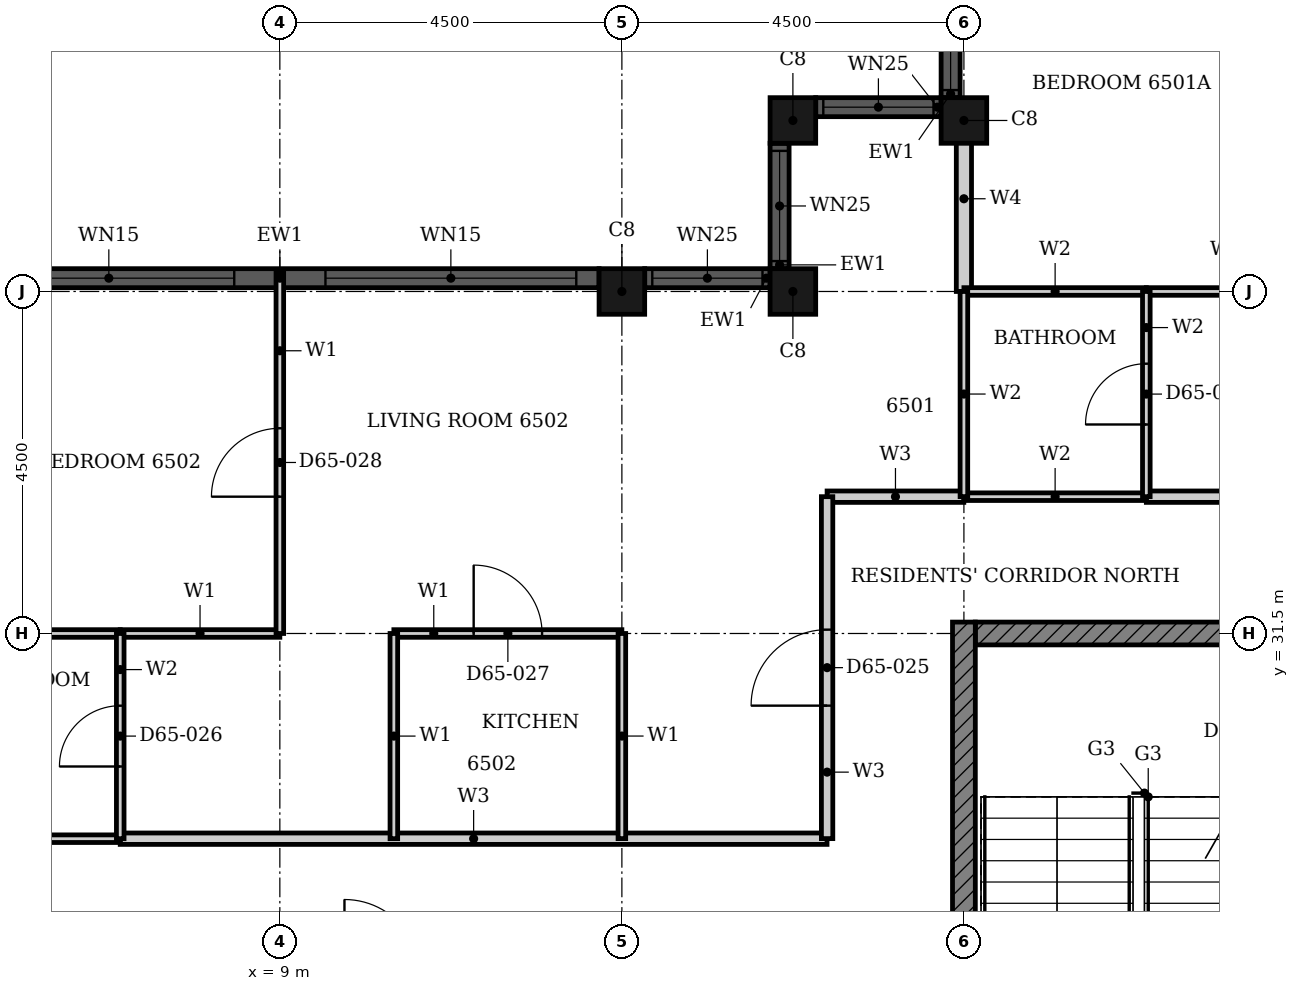
"""IFC4 building model, lengths in metres.
Left out: names, types, materials, properties, quantities, classifications, styles, units other than length and angle.
Written with IfcOpenShell. Run it as: python <this file> out.ifc"""

import sys

from ifc_helpers import new_model, si_unit, direction, frame, frame_2d, origin, origin_2d, place, context, subcontext, project, spatial, rectangle, hollow_rectangle, extrude, element, fill, save


model = new_model("IFC4")
c1 = context("Model", 3, precision=1e-05, world=origin(), true_north=direction((0.0, 1.0)))
c2 = subcontext(c1, "Body", "Model", "MODEL_VIEW")
j1 = project(units=[si_unit("LENGTHUNIT", "METRE"), si_unit("PLANEANGLEUNIT", "RADIAN")], contexts=[c1])
p1 = place(None, origin())
s1 = spatial("IfcSite", under=j1, at=p1, CompositionType="ELEMENT")
p2 = place(p1, origin())
s2 = spatial("IfcBuilding", under=s1, at=p2, CompositionType="ELEMENT")
p3 = place(p2, frame((0.0, 0.0, 256.4)))
s3 = spatial("IfcBuildingStorey", under=s2, at=p3, CompositionType="ELEMENT", Elevation=256.4)
for number, where, z_axis, x_axis in (
    (1, (18.0, 38.25, 0.0), (0.0, 0.0, 1.0), (1.0, 0.0, 0.0)),
    (2, (15.75, 38.25, 0.0), (0.0, 0.0, 1.0), (1.0, 0.0, 0.0)),
    (3, (15.75, 36.0, 0.0), (0.0, 0.0, 1.0), (1.0, 0.0, 0.0)),
    (4, (13.5, 36.0, 0.0), (0.0, 0.0, 1.0), (1.0, 0.0, 0.0)),
):
    element("IfcColumn", number, at=place(p3, frame(where, z_axis=z_axis, x_axis=x_axis)), inside=s3, PredefinedType="COLUMN", context=c2, shape_type="SweptSolid", body=[
        extrude(hollow_rectangle(XDim=0.6, YDim=0.6, WallThickness=0.02, at=origin_2d()), origin(), (0.0, 0.0, 1.0), 3.7),
    ])
p4 = place(p3, frame((17.825, 40.2, 0.0), z_axis=(0.0, 0.0, 1.0), x_axis=(0.0, -1.0, 0.0)))
e5 = element("IfcWall", 5, at=p4, inside=s3, PredefinedType="SOLIDWALL", context=c2, shape_type="SweptSolid", body=[
    extrude(rectangle(XDim=1.65, YDim=0.25, at=frame_2d((0.825, 0.0))), origin(), (0.0, 0.0, 1.0), 3.7),
])
p5 = place(p4, frame((0.1, 0.0, 0.9)))
e6 = element("IfcOpeningElement", 6, at=p5, cuts=e5, PredefinedType="OPENING", context=c2, shape_type="SweptSolid", body=[
    extrude(rectangle(XDim=1.45, YDim=1.85, at=frame_2d((0.725, 0.925))), frame((0.0, 0.135, 0.0), z_axis=(0.0, -1.0, 0.0), x_axis=(1.0, 0.0, 0.0)), (0.0, 0.0, 1.0), 0.27),
])
p6 = place(p3, frame((17.7, 38.425, 0.0), z_axis=(0.0, 0.0, 1.0), x_axis=(-1.0, 0.0, 0.0)))
e7 = element("IfcWall", 7, at=p6, inside=s3, PredefinedType="SOLIDWALL", context=c2, shape_type="SweptSolid", body=[
    extrude(rectangle(XDim=1.65, YDim=0.25, at=frame_2d((0.825, 0.0))), origin(), (0.0, 0.0, 1.0), 3.7),
])
p7 = place(p6, frame((0.1, 0.0, 0.9)))
e8 = element("IfcOpeningElement", 8, at=p7, cuts=e7, PredefinedType="OPENING", context=c2, shape_type="SweptSolid", body=[
    extrude(rectangle(XDim=1.45, YDim=1.85, at=frame_2d((0.725, 0.925))), frame((0.0, 0.135, 0.0), z_axis=(0.0, -1.0, 0.0), x_axis=(1.0, 0.0, 0.0)), (0.0, 0.0, 1.0), 0.27),
])
p8 = place(p3, frame((15.575, 37.95, 0.0), z_axis=(0.0, 0.0, 1.0), x_axis=(0.0, -1.0, 0.0)))
e9 = element("IfcWall", 9, at=p8, inside=s3, PredefinedType="SOLIDWALL", context=c2, shape_type="SweptSolid", body=[
    extrude(rectangle(XDim=1.65, YDim=0.25, at=frame_2d((0.825, 0.0))), origin(), (0.0, 0.0, 1.0), 3.7),
])
p9 = place(p8, frame((0.1, 0.0, 0.9)))
e10 = element("IfcOpeningElement", 10, at=p9, cuts=e9, PredefinedType="OPENING", context=c2, shape_type="SweptSolid", body=[
    extrude(rectangle(XDim=1.45, YDim=1.85, at=frame_2d((0.725, 0.925))), frame((0.0, 0.135, 0.0), z_axis=(0.0, -1.0, 0.0), x_axis=(1.0, 0.0, 0.0)), (0.0, 0.0, 1.0), 0.27),
])
p10 = place(p3, frame((15.45, 36.175, 0.0), z_axis=(0.0, 0.0, 1.0), x_axis=(-1.0, 0.0, 0.0)))
e11 = element("IfcWall", 11, at=p10, inside=s3, PredefinedType="SOLIDWALL", context=c2, shape_type="SweptSolid", body=[
    extrude(rectangle(XDim=1.65, YDim=0.25, at=frame_2d((0.825, 0.0))), origin(), (0.0, 0.0, 1.0), 3.7),
])
p11 = place(p10, frame((0.1, 0.0, 0.9)))
e12 = element("IfcOpeningElement", 12, at=p11, cuts=e11, PredefinedType="OPENING", context=c2, shape_type="SweptSolid", body=[
    extrude(rectangle(XDim=1.45, YDim=1.85, at=frame_2d((0.725, 0.925))), frame((0.0, 0.135, 0.0), z_axis=(0.0, -1.0, 0.0), x_axis=(1.0, 0.0, 0.0)), (0.0, 0.0, 1.0), 0.27),
])
p12 = place(p3, frame((13.2, 36.175, 0.0), z_axis=(0.0, 0.0, 1.0), x_axis=(-1.0, 0.0, 0.0)))
e13 = element("IfcWall", 13, at=p12, inside=s3, PredefinedType="SOLIDWALL", context=c2, shape_type="SweptSolid", body=[
    extrude(rectangle(XDim=8.4, YDim=0.25, at=frame_2d((4.2, 0.0))), origin(), (0.0, 0.0, 1.0), 3.7),
])
p13 = place(p12, frame((0.3, 0.0, 0.45)))
e14 = element("IfcOpeningElement", 14, at=p13, cuts=e13, PredefinedType="OPENING", context=c2, shape_type="SweptSolid", body=[
    extrude(rectangle(XDim=3.3, YDim=2.3, at=frame_2d((1.65, 1.15))), frame((0.0, 0.135, 0.0), z_axis=(0.0, -1.0, 0.0), x_axis=(1.0, 0.0, 0.0)), (0.0, 0.0, 1.0), 0.27),
])
p14 = place(p12, frame((4.8, 0.0, 0.45)))
e15 = element("IfcOpeningElement", 15, at=p14, cuts=e13, PredefinedType="OPENING", context=c2, shape_type="SweptSolid", body=[
    extrude(rectangle(XDim=3.3, YDim=2.3, at=frame_2d((1.65, 1.15))), frame((0.0, 0.135, 0.0), z_axis=(0.0, -1.0, 0.0), x_axis=(1.0, 0.0, 0.0)), (0.0, 0.0, 1.0), 0.27),
])
p15 = place(p3, frame((18.15, 31.5, 0.0), z_axis=(0.0, 0.0, 1.0), x_axis=(1.0, 0.0, 0.0)))
e16 = element("IfcWall", 16, at=p15, inside=s3, PredefinedType="SHEAR", context=c2, shape_type="SweptSolid", body=[
    extrude(rectangle(XDim=9.368, YDim=0.3, at=frame_2d((4.684, 0.0))), origin(), (0.0, 0.0, 1.0), 3.4),
])
p16 = place(p15, frame((4.736, 0.0, 0.0)))
e17 = element("IfcOpeningElement", 17, at=p16, cuts=e16, PredefinedType="OPENING", context=c2, shape_type="SweptSolid", body=[
    extrude(rectangle(XDim=1.8, YDim=2.1, at=frame_2d((0.9, 1.05))), frame((0.0, 0.16, 0.0), z_axis=(0.0, -1.0, 0.0), x_axis=(1.0, 0.0, 0.0)), (0.0, 0.0, 1.0), 0.32),
])
p17 = place(p3, frame((18.0, 22.35, 0.0), z_axis=(0.0, 0.0, 1.0), x_axis=(0.0, 1.0, 0.0)))
e18 = element("IfcWall", 18, at=p17, inside=s3, PredefinedType="SHEAR", context=c2, shape_type="SweptSolid", body=[
    extrude(rectangle(XDim=9.3, YDim=0.3, at=frame_2d((4.65, 0.0))), origin(), (0.0, 0.0, 1.0), 3.4),
])
p18 = place(p3, frame((6.9, 28.8, 0.0), z_axis=(0.0, 0.0, 1.0), x_axis=(1.0, 0.0, 0.0)))
e19 = element("IfcWall", 19, at=p18, inside=s3, PredefinedType="PARTITIONING", context=c2, shape_type="SweptSolid", body=[
    extrude(rectangle(XDim=9.299, YDim=0.15, at=frame_2d((4.649, 0.0))), origin(), (0.0, 0.0, 1.0), 3.4),
])
p19 = place(p3, frame((20.4, 33.3, 0.0), z_axis=(0.0, 0.0, 1.0), x_axis=(1.0, 0.0, 0.0)))
e20 = element("IfcWall", 20, at=p19, inside=s3, PredefinedType="PARTITIONING", context=c2, shape_type="SweptSolid", body=[
    extrude(rectangle(XDim=24.6, YDim=0.15, at=frame_2d((12.3, 0.0))), origin(), (0.0, 0.0, 1.0), 3.4),
])
p20 = place(p19, frame((1.6, 0.0, 0.0)))
e21 = element("IfcOpeningElement", 21, at=p20, cuts=e20, PredefinedType="OPENING", context=c2, shape_type="SweptSolid", body=[
    extrude(rectangle(XDim=1.0, YDim=2.2, at=frame_2d((0.5, 1.1))), frame((0.0, 0.085, 0.0), z_axis=(0.0, -1.0, 0.0), x_axis=(1.0, 0.0, 0.0)), (0.0, 0.0, 1.0), 0.17),
])
p21 = place(p19, frame((17.35, 0.0, 0.0)))
e22 = element("IfcOpeningElement", 22, at=p21, cuts=e20, PredefinedType="OPENING", context=c2, shape_type="SweptSolid", body=[
    extrude(rectangle(XDim=1.0, YDim=2.1, at=frame_2d((0.5, 1.05))), frame((0.0, 0.085, 0.0), z_axis=(0.0, -1.0, 0.0), x_axis=(1.0, 0.0, 0.0)), (0.0, 0.0, 1.0), 0.17),
])
p22 = place(p3, frame((16.2, 33.3, 0.0), z_axis=(0.0, 0.0, 1.0), x_axis=(1.0, 0.0, 0.0)))
e23 = element("IfcWall", 23, at=p22, inside=s3, PredefinedType="PARTITIONING", context=c2, shape_type="SweptSolid", body=[
    extrude(rectangle(XDim=1.799, YDim=0.15, at=frame_2d((0.899, 0.0))), origin(), (0.0, 0.0, 1.0), 3.4),
])
p23 = place(p3, frame((16.2, 28.801, 0.0), z_axis=(0.0, 0.0, 1.0), x_axis=(0.0, 1.0, 0.0)))
e24 = element("IfcWall", 24, at=p23, inside=s3, PredefinedType="PARTITIONING", context=c2, shape_type="SweptSolid", body=[
    extrude(rectangle(XDim=4.499, YDim=0.15, at=frame_2d((2.25, 0.0))), origin(), (0.0, 0.0, 1.0), 3.4),
])
p24 = place(p23, frame((1.75, 0.0, 0.0)))
e25 = element("IfcOpeningElement", 25, at=p24, cuts=e24, PredefinedType="OPENING", context=c2, shape_type="SweptSolid", body=[
    extrude(rectangle(XDim=1.0, YDim=2.2, at=frame_2d((0.5, 1.1))), frame((0.0, 0.085, 0.0), z_axis=(0.0, -1.0, 0.0), x_axis=(1.0, 0.0, 0.0)), (0.0, 0.0, 1.0), 0.17),
])
p25 = place(p3, frame((6.9, 31.5, 0.0), z_axis=(0.0, 0.0, 1.0), x_axis=(1.0, 0.0, 0.0)))
e26 = element("IfcWall", 26, at=p25, inside=s3, PredefinedType="PARTITIONING", context=c2, shape_type="SweptSolid", body=[
    extrude(rectangle(XDim=2.1, YDim=0.1, at=frame_2d((1.05, 0.0))), origin(), (0.0, 0.0, 1.0), 2.68),
])
p26 = place(p3, frame((10.5, 31.5, 0.0), z_axis=(0.0, 0.0, 1.0), x_axis=(1.0, 0.0, 0.0)))
e27 = element("IfcWall", 27, at=p26, inside=s3, PredefinedType="PARTITIONING", context=c2, shape_type="SweptSolid", body=[
    extrude(rectangle(XDim=3.0, YDim=0.1, at=frame_2d((1.5, 0.0))), origin(), (0.0, 0.0, 1.0), 2.68),
])
p27 = place(p26, frame((1.05, 0.0, 0.0)))
e28 = element("IfcOpeningElement", 28, at=p27, cuts=e27, PredefinedType="OPENING", context=c2, shape_type="SweptSolid", body=[
    extrude(rectangle(XDim=0.9, YDim=2.1, at=frame_2d((0.45, 1.05))), frame((0.0, 0.06, 0.0), z_axis=(0.0, -1.0, 0.0), x_axis=(1.0, 0.0, 0.0)), (0.0, 0.0, 1.0), 0.12),
])
p28 = place(p3, frame((20.4, 36.0, 0.0), z_axis=(0.0, 0.0, 1.0), x_axis=(1.0, 0.0, 0.0)))
e29 = element("IfcWall", 29, at=p28, inside=s3, PredefinedType="PARTITIONING", context=c2, shape_type="SweptSolid", body=[
    extrude(rectangle(XDim=2.1, YDim=0.1, at=frame_2d((1.05, 0.0))), origin(), (0.0, 0.0, 1.0), 3.4),
])
p29 = place(p3, frame((10.5, 28.8, 0.0), z_axis=(0.0, 0.0, 1.0), x_axis=(0.0, 1.0, 0.0)))
e30 = element("IfcWall", 30, at=p29, inside=s3, PredefinedType="PARTITIONING", context=c2, shape_type="SweptSolid", body=[
    extrude(rectangle(XDim=2.7, YDim=0.1, at=frame_2d((1.35, 0.0))), origin(), (0.0, 0.0, 1.0), 3.4),
])
p30 = place(p3, frame((13.5, 28.801, 0.0), z_axis=(0.0, 0.0, 1.0), x_axis=(0.0, 1.0, 0.0)))
e31 = element("IfcWall", 31, at=p30, inside=s3, PredefinedType="PARTITIONING", context=c2, shape_type="SweptSolid", body=[
    extrude(rectangle(XDim=2.699, YDim=0.1, at=frame_2d((1.35, 0.0))), origin(), (0.0, 0.0, 1.0), 2.48),
])
p31 = place(p3, frame((9.0, 31.5, 0.0), z_axis=(0.0, 0.0, 1.0), x_axis=(0.0, 1.0, 0.0)))
e32 = element("IfcWall", 32, at=p31, inside=s3, PredefinedType="PARTITIONING", context=c2, shape_type="SweptSolid", body=[
    extrude(rectangle(XDim=4.74, YDim=0.1, at=frame_2d((2.37, 0.0))), origin(), (0.0, 0.0, 1.0), 3.4),
])
p32 = place(p31, frame((1.8, 0.0, 0.0)))
e33 = element("IfcOpeningElement", 33, at=p32, cuts=e32, PredefinedType="OPENING", context=c2, shape_type="SweptSolid", body=[
    extrude(rectangle(XDim=0.9, YDim=2.1, at=frame_2d((0.45, 1.05))), frame((0.0, 0.06, 0.0), z_axis=(0.0, -1.0, 0.0), x_axis=(1.0, 0.0, 0.0)), (0.0, 0.0, 1.0), 0.12),
])
p33 = place(p3, frame((18.0, 36.0, 0.0), z_axis=(0.0, 0.0, 1.0), x_axis=(0.0, 1.0, 0.0)))
e34 = element("IfcWall", 34, at=p33, inside=s3, PredefinedType="PARTITIONING", context=c2, shape_type="SweptSolid", body=[
    extrude(rectangle(XDim=2.44, YDim=0.2, at=frame_2d((1.22, 0.0))), origin(), (0.0, 0.0, 1.0), 3.4),
])
p34 = place(p3, frame((4.5, 28.8, 0.0), z_axis=(0.0, 0.0, 1.0), x_axis=(1.0, 0.0, 0.0)))
e35 = element("IfcWall", 35, at=p34, inside=s3, PredefinedType="PARTITIONING", context=c2, shape_type="SweptSolid", body=[
    extrude(rectangle(XDim=2.4, YDim=0.1, at=frame_2d((1.2, 0.0))), origin(), (0.0, 0.0, 1.0), 3.4),
])
p35 = place(p3, frame((4.5, 31.5, 0.0), z_axis=(0.0, 0.0, 1.0), x_axis=(1.0, 0.0, 0.0)))
e36 = element("IfcWall", 36, at=p35, inside=s3, PredefinedType="PARTITIONING", context=c2, shape_type="SweptSolid", body=[
    extrude(rectangle(XDim=2.4, YDim=0.1, at=frame_2d((1.2, 0.0))), origin(), (0.0, 0.0, 1.0), 2.68),
])
for number, where, z_axis, x_axis in (
    (37, (18.0, 33.3, 0.0), (0.0, 0.0, 1.0), (1.0, 0.0, 0.0)),
    (38, (18.0, 36.0, 0.0), (0.0, 0.0, 1.0), (1.0, 0.0, 0.0)),
):
    element("IfcWall", number, at=place(p3, frame(where, z_axis=z_axis, x_axis=x_axis)), inside=s3, PredefinedType="PARTITIONING", context=c2, shape_type="SweptSolid", body=[
        extrude(rectangle(XDim=2.4, YDim=0.1, at=frame_2d((1.2, 0.0))), origin(), (0.0, 0.0, 1.0), 3.4),
    ])
p36 = place(p3, frame((18.0, 33.301, 0.0), z_axis=(0.0, 0.0, 1.0), x_axis=(0.0, 1.0, 0.0)))
e39 = element("IfcWall", 39, at=p36, inside=s3, PredefinedType="PARTITIONING", context=c2, shape_type="SweptSolid", body=[
    extrude(rectangle(XDim=2.699, YDim=0.1, at=frame_2d((1.35, 0.0))), origin(), (0.0, 0.0, 1.0), 3.4),
])
p37 = place(p3, frame((20.4, 33.3, 0.0), z_axis=(0.0, 0.0, 1.0), x_axis=(0.0, 1.0, 0.0)))
e40 = element("IfcWall", 40, at=p37, inside=s3, PredefinedType="PARTITIONING", context=c2, shape_type="SweptSolid", body=[
    extrude(rectangle(XDim=2.7, YDim=0.1, at=frame_2d((1.35, 0.0))), origin(), (0.0, 0.0, 1.0), 3.4),
])
p38 = place(p37, frame((0.95, 0.0, 0.0)))
e41 = element("IfcOpeningElement", 41, at=p38, cuts=e40, PredefinedType="OPENING", context=c2, shape_type="SweptSolid", body=[
    extrude(rectangle(XDim=0.8, YDim=2.1, at=frame_2d((0.4, 1.05))), frame((0.0, 0.06, 0.0), z_axis=(0.0, -1.0, 0.0), x_axis=(1.0, 0.0, 0.0)), (0.0, 0.0, 1.0), 0.12),
])
p39 = place(p3, frame((6.9, 28.8, 0.0), z_axis=(0.0, 0.0, 1.0), x_axis=(0.0, 1.0, 0.0)))
e42 = element("IfcWall", 42, at=p39, inside=s3, PredefinedType="PARTITIONING", context=c2, shape_type="SweptSolid", body=[
    extrude(rectangle(XDim=2.7, YDim=0.1, at=frame_2d((1.35, 0.0))), origin(), (0.0, 0.0, 1.0), 3.4),
])
p40 = place(p39, frame((0.95, 0.0, 0.0)))
e43 = element("IfcOpeningElement", 43, at=p40, cuts=e42, PredefinedType="OPENING", context=c2, shape_type="SweptSolid", body=[
    extrude(rectangle(XDim=0.8, YDim=2.1, at=frame_2d((0.4, 1.05))), frame((0.0, 0.06, 0.0), z_axis=(0.0, -1.0, 0.0), x_axis=(1.0, 0.0, 0.0)), (0.0, 0.0, 1.0), 0.12),
])
p41 = place(p5, origin())
e44 = element("IfcWindow", 44, at=p41, inside=s3, PartitioningType="SINGLE_PANEL", PredefinedType="WINDOW", context=c2, shape_type="SweptSolid", body=[
    extrude(rectangle(XDim=1.45, YDim=1.85, at=frame_2d((0.725, 0.925))), frame((0.0, 0.03, 0.0), z_axis=(0.0, -1.0, 0.0), x_axis=(1.0, 0.0, 0.0)), (0.0, 0.0, 1.0), 0.06),
])
fill(e6, e44)
p42 = place(p7, origin())
e45 = element("IfcWindow", 45, at=p42, inside=s3, PartitioningType="SINGLE_PANEL", PredefinedType="WINDOW", context=c2, shape_type="SweptSolid", body=[
    extrude(rectangle(XDim=1.45, YDim=1.85, at=frame_2d((0.725, 0.925))), frame((0.0, 0.03, 0.0), z_axis=(0.0, -1.0, 0.0), x_axis=(1.0, 0.0, 0.0)), (0.0, 0.0, 1.0), 0.06),
])
fill(e8, e45)
p43 = place(p9, origin())
e46 = element("IfcWindow", 46, at=p43, inside=s3, PartitioningType="SINGLE_PANEL", PredefinedType="WINDOW", context=c2, shape_type="SweptSolid", body=[
    extrude(rectangle(XDim=1.45, YDim=1.85, at=frame_2d((0.725, 0.925))), frame((0.0, 0.03, 0.0), z_axis=(0.0, -1.0, 0.0), x_axis=(1.0, 0.0, 0.0)), (0.0, 0.0, 1.0), 0.06),
])
fill(e10, e46)
p44 = place(p11, origin())
e47 = element("IfcWindow", 47, at=p44, inside=s3, PartitioningType="SINGLE_PANEL", PredefinedType="WINDOW", context=c2, shape_type="SweptSolid", body=[
    extrude(rectangle(XDim=1.45, YDim=1.85, at=frame_2d((0.725, 0.925))), frame((0.0, 0.03, 0.0), z_axis=(0.0, -1.0, 0.0), x_axis=(1.0, 0.0, 0.0)), (0.0, 0.0, 1.0), 0.06),
])
fill(e12, e47)
p45 = place(p13, origin())
e48 = element("IfcWindow", 48, at=p45, inside=s3, PartitioningType="SINGLE_PANEL", PredefinedType="WINDOW", context=c2, shape_type="SweptSolid", body=[
    extrude(rectangle(XDim=3.3, YDim=2.3, at=frame_2d((1.65, 1.15))), frame((0.0, 0.03, 0.0), z_axis=(0.0, -1.0, 0.0), x_axis=(1.0, 0.0, 0.0)), (0.0, 0.0, 1.0), 0.06),
])
fill(e14, e48)
p46 = place(p14, origin())
e49 = element("IfcWindow", 49, at=p46, inside=s3, PartitioningType="SINGLE_PANEL", PredefinedType="WINDOW", context=c2, shape_type="SweptSolid", body=[
    extrude(rectangle(XDim=3.3, YDim=2.3, at=frame_2d((1.65, 1.15))), frame((0.0, 0.03, 0.0), z_axis=(0.0, -1.0, 0.0), x_axis=(1.0, 0.0, 0.0)), (0.0, 0.0, 1.0), 0.06),
])
fill(e15, e49)
p47 = place(p38, origin())
e50 = element("IfcDoor", 50, at=p47, inside=s3, OperationType="SINGLE_SWING_RIGHT", PredefinedType="DOOR", context=c2, shape_type="SweptSolid", body=[
    extrude(rectangle(XDim=0.8, YDim=2.1, at=frame_2d((0.4, 1.05))), frame((0.0, 0.025, 0.0), z_axis=(0.0, -1.0, 0.0), x_axis=(1.0, 0.0, 0.0)), (0.0, 0.0, 1.0), 0.05),
])
fill(e41, e50)
p48 = place(p24, origin())
e51 = element("IfcDoor", 51, at=p48, inside=s3, OperationType="SINGLE_SWING_LEFT", PredefinedType="DOOR", context=c2, shape_type="SweptSolid", body=[
    extrude(rectangle(XDim=1.0, YDim=2.2, at=frame_2d((0.5, 1.1))), frame((0.0, 0.025, 0.0), z_axis=(0.0, -1.0, 0.0), x_axis=(1.0, 0.0, 0.0)), (0.0, 0.0, 1.0), 0.05),
])
fill(e25, e51)
p49 = place(p40, origin())
e52 = element("IfcDoor", 52, at=p49, inside=s3, OperationType="SINGLE_SWING_RIGHT", PredefinedType="DOOR", context=c2, shape_type="SweptSolid", body=[
    extrude(rectangle(XDim=0.8, YDim=2.1, at=frame_2d((0.4, 1.05))), frame((0.0, 0.025, 0.0), z_axis=(0.0, -1.0, 0.0), x_axis=(1.0, 0.0, 0.0)), (0.0, 0.0, 1.0), 0.05),
])
fill(e43, e52)
p50 = place(p27, origin())
e53 = element("IfcDoor", 53, at=p50, inside=s3, OperationType="SINGLE_SWING_RIGHT", PredefinedType="DOOR", context=c2, shape_type="SweptSolid", body=[
    extrude(rectangle(XDim=0.9, YDim=2.1, at=frame_2d((0.45, 1.05))), frame((0.0, 0.025, 0.0), z_axis=(0.0, -1.0, 0.0), x_axis=(1.0, 0.0, 0.0)), (0.0, 0.0, 1.0), 0.05),
])
fill(e28, e53)
p51 = place(p32, origin())
e54 = element("IfcDoor", 54, at=p51, inside=s3, OperationType="SINGLE_SWING_LEFT", PredefinedType="DOOR", context=c2, shape_type="SweptSolid", body=[
    extrude(rectangle(XDim=0.9, YDim=2.1, at=frame_2d((0.45, 1.05))), frame((0.0, 0.025, 0.0), z_axis=(0.0, -1.0, 0.0), x_axis=(1.0, 0.0, 0.0)), (0.0, 0.0, 1.0), 0.05),
])
fill(e33, e54)
save(model, sys.argv[1])
